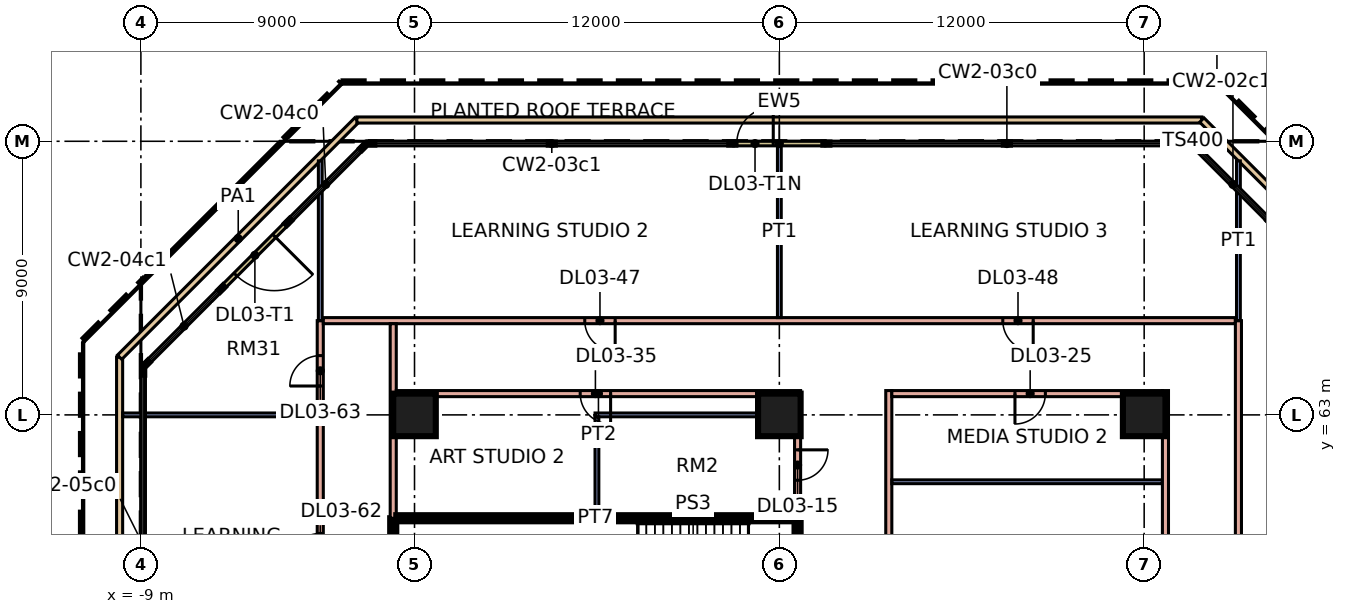
"""IFC4 building model, lengths in metres.
Left out: names, types, materials, properties, quantities, classifications, styles, units other than length and angle.
Written with IfcOpenShell. Run it as: python <this file> out.ifc"""

import sys

from ifc_helpers import new_model, si_unit, direction, frame, frame_2d, origin, origin_2d, place, context, subcontext, project, spatial, rectangle, extrude, element, fill, save


model = new_model("IFC4")
c1 = context("Model", 3, precision=1e-05, world=origin(), true_north=direction((0.0, 1.0)))
c2 = subcontext(c1, "Body", "Model", "MODEL_VIEW")
j1 = project(units=[si_unit("LENGTHUNIT", "METRE"), si_unit("PLANEANGLEUNIT", "RADIAN")], contexts=[c1])
p1 = place(None, origin())
s1 = spatial("IfcSite", under=j1, at=p1, CompositionType="ELEMENT")
p2 = place(p1, origin())
s2 = spatial("IfcBuilding", under=s1, at=p2, CompositionType="ELEMENT")
p3 = place(p2, frame((0.0, 0.0, 16.8)))
s3 = spatial("IfcBuildingStorey", under=s2, at=p3, CompositionType="ELEMENT", Elevation=16.8)
for number, where, z_axis, x_axis in (
    (1, (0.0, 63.0, 0.0), (0.0, 0.0, 1.0), (1.0, 0.0, 0.0)),
    (2, (12.0, 63.0, 0.0), (0.0, 0.0, 1.0), (1.0, 0.0, 0.0)),
    (3, (24.0, 63.0, 0.0), (0.0, 0.0, 1.0), (1.0, 0.0, 0.0)),
):
    element("IfcColumn", number, at=place(p3, frame(where, z_axis=z_axis, x_axis=x_axis)), inside=s3, PredefinedType="COLUMN", context=c2, shape_type="SweptSolid", body=[
        extrude(rectangle(XDim=1.4, YDim=1.4, at=origin_2d()), origin(), (0.0, 0.0, 1.0), 4.8),
    ])
p4 = place(p3, frame((13.5, 71.925, 0.0), z_axis=(0.0, 0.0, 1.0), x_axis=(-1.0, 0.0, 0.0)))
e4 = element("IfcWall", 4, at=p4, inside=s3, PredefinedType="SOLIDWALL", context=c2, shape_type="SweptSolid", body=[
    extrude(rectangle(XDim=3.0, YDim=0.15, at=frame_2d((1.5, 0.0))), origin(), (0.0, 0.0, 1.0), 4.4),
])
p5 = place(p4, frame((1.7, 0.0, 0.0)))
e5 = element("IfcOpeningElement", 5, at=p5, cuts=e4, PredefinedType="OPENING", context=c2, shape_type="SweptSolid", body=[
    extrude(rectangle(XDim=1.2, YDim=2.4, at=frame_2d((0.6, 1.2))), frame((0.0, 0.085, 0.0), z_axis=(0.0, -1.0, 0.0), x_axis=(1.0, 0.0, 0.0)), (0.0, 0.0, 1.0), 0.17),
])
p6 = place(p3, frame((-4.19, 69.311, 0.0), z_axis=(0.0, 0.0, 1.0), x_axis=(-0.707106781187, -0.707106781187, 0.0)))
e6 = element("IfcWall", 6, at=p6, inside=s3, PredefinedType="SOLIDWALL", context=c2, shape_type="SweptSolid", body=[
    extrude(rectangle(XDim=3.0, YDim=0.15, at=frame_2d((1.5, 0.0))), origin(), (0.0, 0.0, 1.0), 4.4),
])
p7 = place(p6, frame((0.6, 0.0, 0.0)))
e7 = element("IfcOpeningElement", 7, at=p7, cuts=e6, PredefinedType="OPENING", context=c2, shape_type="SweptSolid", body=[
    extrude(rectangle(XDim=1.8, YDim=2.4, at=frame_2d((0.9, 1.2))), frame((0.0, 0.085, 0.0), z_axis=(0.0, -1.0, 0.0), x_axis=(1.0, 0.0, 0.0)), (0.0, 0.0, 1.0), 0.17),
])
p8 = place(p3, frame((-9.7, 9.104, 0.0), z_axis=(0.0, 0.0, 1.0), x_axis=(0.0, 1.0, 0.0)))
e8 = element("IfcWall", 8, at=p8, inside=s3, PredefinedType="PARAPET", context=c2, shape_type="SweptSolid", body=[
    extrude(rectangle(XDim=55.793, YDim=0.2, at=frame_2d((27.896, 0.0))), origin(), (0.0, 0.0, 1.0), 0.5),
])
p9 = place(p3, frame((-9.7, 64.896, 0.0), z_axis=(0.0, 0.0, 1.0), x_axis=(0.707106781187, 0.707106781187, 0.0)))
e9 = element("IfcWall", 9, at=p9, inside=s3, PredefinedType="PARAPET", context=c2, shape_type="SweptSolid", body=[
    extrude(rectangle(XDim=11.036, YDim=0.2, at=frame_2d((5.518, 0.0))), origin(), (0.0, 0.0, 1.0), 0.5),
])
p10 = place(p3, frame((-1.896, 72.7, 0.0), z_axis=(0.0, 0.0, 1.0), x_axis=(1.0, 0.0, 0.0)))
e10 = element("IfcWall", 10, at=p10, inside=s3, PredefinedType="PARAPET", context=c2, shape_type="SweptSolid", body=[
    extrude(rectangle(XDim=27.793, YDim=0.2, at=frame_2d((13.896, 0.0))), origin(), (0.0, 0.0, 1.0), 0.5),
])
p11 = place(p3, frame((25.896, 72.7, 0.0), z_axis=(0.0, 0.0, 1.0), x_axis=(0.707106781187, -0.707106781187, 0.0)))
e11 = element("IfcWall", 11, at=p11, inside=s3, PredefinedType="PARAPET", context=c2, shape_type="SweptSolid", body=[
    extrude(rectangle(XDim=11.036, YDim=0.2, at=frame_2d((5.518, 0.0))), origin(), (0.0, 0.0, 1.0), 0.5),
])
p12 = place(p3, frame((-9.6, 63.0, 0.0), z_axis=(0.0, 0.0, 1.0), x_axis=(1.0, 0.0, 0.0)))
e12 = element("IfcWall", 12, at=p12, inside=s3, PredefinedType="PARTITIONING", context=c2, shape_type="SweptSolid", body=[
    extrude(rectangle(XDim=6.4, YDim=0.125, at=frame_2d((3.2, 0.0))), origin(), (0.0, 0.0, 1.0), 4.4),
])
p13 = place(p3, frame((-3.1, 2.645, 0.0), z_axis=(0.0, 0.0, 1.0), x_axis=(0.0, 1.0, 0.0)))
e13 = element("IfcWall", 13, at=p13, inside=s3, PredefinedType="PARTITIONING", context=c2, shape_type="SweptSolid", body=[
    extrude(rectangle(XDim=63.455, YDim=0.2, at=frame_2d((31.728, 0.0))), origin(), (0.0, 0.0, 1.0), 4.4),
])
p14 = place(p13, frame((4.705, 0.0, 0.0)))
e14 = element("IfcOpeningElement", 14, at=p14, cuts=e13, PredefinedType="OPENING", context=c2, shape_type="SweptSolid", body=[
    extrude(rectangle(XDim=1.0, YDim=2.1, at=frame_2d((0.5, 1.05))), frame((0.0, 0.11, 0.0), z_axis=(0.0, -1.0, 0.0), x_axis=(1.0, 0.0, 0.0)), (0.0, 0.0, 1.0), 0.22),
])
p15 = place(p13, frame((14.955, 0.0, 0.0)))
e15 = element("IfcOpeningElement", 15, at=p15, cuts=e13, PredefinedType="OPENING", context=c2, shape_type="SweptSolid", body=[
    extrude(rectangle(XDim=1.0, YDim=2.1, at=frame_2d((0.5, 1.05))), frame((0.0, 0.11, 0.0), z_axis=(0.0, -1.0, 0.0), x_axis=(1.0, 0.0, 0.0)), (0.0, 0.0, 1.0), 0.22),
])
p16 = place(p13, frame((26.955, 0.0, 0.0)))
e16 = element("IfcOpeningElement", 16, at=p16, cuts=e13, PredefinedType="OPENING", context=c2, shape_type="SweptSolid", body=[
    extrude(rectangle(XDim=1.0, YDim=2.1, at=frame_2d((0.5, 1.05))), frame((0.0, 0.11, 0.0), z_axis=(0.0, -1.0, 0.0), x_axis=(1.0, 0.0, 0.0)), (0.0, 0.0, 1.0), 0.22),
])
p17 = place(p13, frame((37.455, 0.0, 0.0)))
e17 = element("IfcOpeningElement", 17, at=p17, cuts=e13, PredefinedType="OPENING", context=c2, shape_type="SweptSolid", body=[
    extrude(rectangle(XDim=1.0, YDim=2.1, at=frame_2d((0.5, 1.05))), frame((0.0, 0.11, 0.0), z_axis=(0.0, -1.0, 0.0), x_axis=(1.0, 0.0, 0.0)), (0.0, 0.0, 1.0), 0.22),
])
p18 = place(p13, frame((46.455, 0.0, 0.0)))
e18 = element("IfcOpeningElement", 18, at=p18, cuts=e13, PredefinedType="OPENING", context=c2, shape_type="SweptSolid", body=[
    extrude(rectangle(XDim=1.0, YDim=2.1, at=frame_2d((0.5, 1.05))), frame((0.0, 0.11, 0.0), z_axis=(0.0, -1.0, 0.0), x_axis=(1.0, 0.0, 0.0)), (0.0, 0.0, 1.0), 0.22),
])
p19 = place(p13, frame((55.455, 0.0, 0.0)))
e19 = element("IfcOpeningElement", 19, at=p19, cuts=e13, PredefinedType="OPENING", context=c2, shape_type="SweptSolid", body=[
    extrude(rectangle(XDim=1.0, YDim=2.1, at=frame_2d((0.5, 1.05))), frame((0.0, 0.11, 0.0), z_axis=(0.0, -1.0, 0.0), x_axis=(1.0, 0.0, 0.0)), (0.0, 0.0, 1.0), 0.22),
])
p20 = place(p13, frame((61.305, 0.0, 0.0)))
e20 = element("IfcOpeningElement", 20, at=p20, cuts=e13, PredefinedType="OPENING", context=c2, shape_type="SweptSolid", body=[
    extrude(rectangle(XDim=1.0, YDim=2.1, at=frame_2d((0.5, 1.05))), frame((0.0, 0.11, 0.0), z_axis=(0.0, -1.0, 0.0), x_axis=(1.0, 0.0, 0.0)), (0.0, 0.0, 1.0), 0.22),
])
p21 = place(p3, frame((-3.1, 66.1, 0.0), z_axis=(0.0, 0.0, 1.0), x_axis=(0.0, 1.0, 0.0)))
e21 = element("IfcWall", 21, at=p21, inside=s3, PredefinedType="PARTITIONING", context=c2, shape_type="SweptSolid", body=[
    extrude(rectangle(XDim=5.255, YDim=0.125, at=frame_2d((2.627, 0.0))), origin(), (0.0, 0.0, 1.0), 4.4),
])
p22 = place(p3, frame((-3.0, 66.1, 0.0), z_axis=(0.0, 0.0, 1.0), x_axis=(1.0, 0.0, 0.0)))
e22 = element("IfcWall", 22, at=p22, inside=s3, PredefinedType="PARTITIONING", context=c2, shape_type="SweptSolid", body=[
    extrude(rectangle(XDim=30.0, YDim=0.2, at=frame_2d((15.0, 0.0))), origin(), (0.0, 0.0, 1.0), 4.4),
])
p23 = place(p22, frame((8.6, 0.0, 0.0)))
e23 = element("IfcOpeningElement", 23, at=p23, cuts=e22, PredefinedType="OPENING", context=c2, shape_type="SweptSolid", body=[
    extrude(rectangle(XDim=1.0, YDim=2.1, at=frame_2d((0.5, 1.05))), frame((0.0, 0.11, 0.0), z_axis=(0.0, -1.0, 0.0), x_axis=(1.0, 0.0, 0.0)), (0.0, 0.0, 1.0), 0.22),
])
p24 = place(p22, frame((22.35, 0.0, 0.0)))
e24 = element("IfcOpeningElement", 24, at=p24, cuts=e22, PredefinedType="OPENING", context=c2, shape_type="SweptSolid", body=[
    extrude(rectangle(XDim=1.0, YDim=2.1, at=frame_2d((0.5, 1.05))), frame((0.0, 0.11, 0.0), z_axis=(0.0, -1.0, 0.0), x_axis=(1.0, 0.0, 0.0)), (0.0, 0.0, 1.0), 0.22),
])
p25 = place(p3, frame((-0.7, 54.0, 0.0), z_axis=(0.0, 0.0, 1.0), x_axis=(0.0, 1.0, 0.0)))
e25 = element("IfcWall", 25, at=p25, inside=s3, PredefinedType="SOLIDWALL", context=c2, shape_type="SweptSolid", body=[
    extrude(rectangle(XDim=5.6, YDim=0.2, at=frame_2d((2.8, 0.0))), origin(), (0.0, 0.0, 1.0), 4.4),
])
p26 = place(p3, frame((-0.7, 59.6, 0.0), z_axis=(0.0, 0.0, 1.0), x_axis=(0.0, 1.0, 0.0)))
e26 = element("IfcWall", 26, at=p26, inside=s3, PredefinedType="PARTITIONING", context=c2, shape_type="SweptSolid", body=[
    extrude(rectangle(XDim=6.4, YDim=0.2, at=frame_2d((3.2, 0.0))), origin(), (0.0, 0.0, 1.0), 4.4),
])
p27 = place(p3, frame((-0.6, 59.6, 0.0), z_axis=(0.0, 0.0, 1.0), x_axis=(1.0, 0.0, 0.0)))
e27 = element("IfcWall", 27, at=p27, inside=s3, PredefinedType="SOLIDWALL", context=c2, shape_type="SweptSolid", body=[
    extrude(rectangle(XDim=13.1, YDim=0.2, at=frame_2d((6.55, 0.0))), origin(), (0.0, 0.0, 1.0), 4.4),
])
p28 = place(p3, frame((-0.6, 63.7, 0.0), z_axis=(0.0, 0.0, 1.0), x_axis=(1.0, 0.0, 0.0)))
e28 = element("IfcWall", 28, at=p28, inside=s3, PredefinedType="PARTITIONING", context=c2, shape_type="SweptSolid", body=[
    extrude(rectangle(XDim=13.3, YDim=0.2, at=frame_2d((6.65, 0.0))), origin(), (0.0, 0.0, 1.0), 4.4),
])
p29 = place(p28, frame((6.05, 0.0, 0.0)))
e29 = element("IfcOpeningElement", 29, at=p29, cuts=e28, PredefinedType="OPENING", context=c2, shape_type="SweptSolid", body=[
    extrude(rectangle(XDim=1.0, YDim=2.1, at=frame_2d((0.5, 1.05))), frame((0.0, 0.11, 0.0), z_axis=(0.0, -1.0, 0.0), x_axis=(1.0, 0.0, 0.0)), (0.0, 0.0, 1.0), 0.22),
])
p30 = place(p3, frame((5.938, 63.0, 0.0), z_axis=(0.0, 0.0, 1.0), x_axis=(1.0, 0.0, 0.0)))
e30 = element("IfcWall", 30, at=p30, inside=s3, PredefinedType="PARTITIONING", context=c2, shape_type="SweptSolid", body=[
    extrude(rectangle(XDim=6.562, YDim=0.125, at=frame_2d((3.281, 0.0))), origin(), (0.0, 0.0, 1.0), 4.4),
])
p31 = place(p3, frame((6.0, 59.7, 0.0), z_axis=(0.0, 0.0, 1.0), x_axis=(0.0, 1.0, 0.0)))
e31 = element("IfcWall", 31, at=p31, inside=s3, PredefinedType="PARTITIONING", context=c2, shape_type="SweptSolid", body=[
    extrude(rectangle(XDim=3.238, YDim=0.125, at=frame_2d((1.619, 0.0))), origin(), (0.0, 0.0, 1.0), 4.4),
])
p32 = place(p3, frame((12.0, 66.2, 0.0), z_axis=(0.0, 0.0, 1.0), x_axis=(0.0, 1.0, 0.0)))
e32 = element("IfcWall", 32, at=p32, inside=s3, PredefinedType="PARTITIONING", context=c2, shape_type="SweptSolid", body=[
    extrude(rectangle(XDim=5.651, YDim=0.125, at=frame_2d((2.826, 0.0))), origin(), (0.0, 0.0, 1.0), 4.4),
])
p33 = place(p3, frame((12.6, 54.0, 0.0), z_axis=(0.0, 0.0, 1.0), x_axis=(0.0, 1.0, 0.0)))
e33 = element("IfcWall", 33, at=p33, inside=s3, PredefinedType="SOLIDWALL", context=c2, shape_type="SweptSolid", body=[
    extrude(rectangle(XDim=5.6, YDim=0.2, at=frame_2d((2.8, 0.0))), origin(), (0.0, 0.0, 1.0), 4.4),
])
p34 = place(p33, frame((3.25, 0.0, 0.0)))
e34 = element("IfcOpeningElement", 34, at=p34, cuts=e33, PredefinedType="OPENING", context=c2, shape_type="SweptSolid", body=[
    extrude(rectangle(XDim=1.2, YDim=2.1, at=frame_2d((0.6, 1.05))), frame((0.0, 0.11, 0.0), z_axis=(0.0, -1.0, 0.0), x_axis=(1.0, 0.0, 0.0)), (0.0, 0.0, 1.0), 0.22),
])
p35 = place(p3, frame((12.6, 59.6, 0.0), z_axis=(0.0, 0.0, 1.0), x_axis=(0.0, 1.0, 0.0)))
e35 = element("IfcWall", 35, at=p35, inside=s3, PredefinedType="PARTITIONING", context=c2, shape_type="SweptSolid", body=[
    extrude(rectangle(XDim=4.0, YDim=0.2, at=frame_2d((2.0, 0.0))), origin(), (0.0, 0.0, 1.0), 4.4),
])
p36 = place(p35, frame((1.25, 0.0, 0.0)))
e36 = element("IfcOpeningElement", 36, at=p36, cuts=e35, PredefinedType="OPENING", context=c2, shape_type="SweptSolid", body=[
    extrude(rectangle(XDim=1.0, YDim=2.1, at=frame_2d((0.5, 1.05))), frame((0.0, 0.11, 0.0), z_axis=(0.0, -1.0, 0.0), x_axis=(1.0, 0.0, 0.0)), (0.0, 0.0, 1.0), 0.22),
])
p37 = place(p3, frame((15.6, 51.225, 0.0), z_axis=(0.0, 0.0, 1.0), x_axis=(0.0, 1.0, 0.0)))
e37 = element("IfcWall", 37, at=p37, inside=s3, PredefinedType="PARTITIONING", context=c2, shape_type="SweptSolid", body=[
    extrude(rectangle(XDim=12.575, YDim=0.2, at=frame_2d((6.288, 0.0))), origin(), (0.0, 0.0, 1.0), 4.4),
])
p38 = place(p37, frame((6.025, 0.0, 0.0)))
e38 = element("IfcOpeningElement", 38, at=p38, cuts=e37, PredefinedType="OPENING", context=c2, shape_type="SweptSolid", body=[
    extrude(rectangle(XDim=1.0, YDim=2.1, at=frame_2d((0.5, 1.05))), frame((0.0, 0.11, 0.0), z_axis=(0.0, -1.0, 0.0), x_axis=(1.0, 0.0, 0.0)), (0.0, 0.0, 1.0), 0.22),
])
p39 = place(p3, frame((15.7, 60.8, 0.0), z_axis=(0.0, 0.0, 1.0), x_axis=(1.0, 0.0, 0.0)))
e39 = element("IfcWall", 39, at=p39, inside=s3, PredefinedType="PARTITIONING", context=c2, shape_type="SweptSolid", body=[
    extrude(rectangle(XDim=8.9, YDim=0.125, at=frame_2d((4.45, 0.0))), origin(), (0.0, 0.0, 1.0), 4.4),
])
p40 = place(p3, frame((15.7, 63.7, 0.0), z_axis=(0.0, 0.0, 1.0), x_axis=(1.0, 0.0, 0.0)))
e40 = element("IfcWall", 40, at=p40, inside=s3, PredefinedType="PARTITIONING", context=c2, shape_type="SweptSolid", body=[
    extrude(rectangle(XDim=8.9, YDim=0.2, at=frame_2d((4.45, 0.0))), origin(), (0.0, 0.0, 1.0), 4.4),
])
p41 = place(p40, frame((4.05, 0.0, 0.0)))
e41 = element("IfcOpeningElement", 41, at=p41, cuts=e40, PredefinedType="OPENING", context=c2, shape_type="SweptSolid", body=[
    extrude(rectangle(XDim=1.0, YDim=2.1, at=frame_2d((0.5, 1.05))), frame((0.0, 0.11, 0.0), z_axis=(0.0, -1.0, 0.0), x_axis=(1.0, 0.0, 0.0)), (0.0, 0.0, 1.0), 0.22),
])
p42 = place(p3, frame((24.7, 44.3, 0.0), z_axis=(0.0, 0.0, 1.0), x_axis=(0.0, 1.0, 0.0)))
e42 = element("IfcWall", 42, at=p42, inside=s3, PredefinedType="PARTITIONING", context=c2, shape_type="SweptSolid", body=[
    extrude(rectangle(XDim=19.5, YDim=0.2, at=frame_2d((9.75, 0.0))), origin(), (0.0, 0.0, 1.0), 4.4),
])
p43 = place(p42, frame((1.45, 0.0, 0.0)))
e43 = element("IfcOpeningElement", 43, at=p43, cuts=e42, PredefinedType="OPENING", context=c2, shape_type="SweptSolid", body=[
    extrude(rectangle(XDim=1.0, YDim=2.1, at=frame_2d((0.5, 1.05))), frame((0.0, 0.11, 0.0), z_axis=(0.0, -1.0, 0.0), x_axis=(1.0, 0.0, 0.0)), (0.0, 0.0, 1.0), 0.22),
])
p44 = place(p42, frame((6.65, 0.0, 0.0)))
e44 = element("IfcOpeningElement", 44, at=p44, cuts=e42, PredefinedType="OPENING", context=c2, shape_type="SweptSolid", body=[
    extrude(rectangle(XDim=1.0, YDim=2.1, at=frame_2d((0.5, 1.05))), frame((0.0, 0.11, 0.0), z_axis=(0.0, -1.0, 0.0), x_axis=(1.0, 0.0, 0.0)), (0.0, 0.0, 1.0), 0.22),
])
p45 = place(p3, frame((27.1, 38.5, 0.0), z_axis=(0.0, 0.0, 1.0), x_axis=(0.0, 1.0, 0.0)))
e45 = element("IfcWall", 45, at=p45, inside=s3, PredefinedType="PARTITIONING", context=c2, shape_type="SweptSolid", body=[
    extrude(rectangle(XDim=27.6, YDim=0.2, at=frame_2d((13.8, 0.0))), origin(), (0.0, 0.0, 1.0), 4.4),
])
p46 = place(p45, frame((13.05, 0.0, 0.0)))
e46 = element("IfcOpeningElement", 46, at=p46, cuts=e45, PredefinedType="OPENING", context=c2, shape_type="SweptSolid", body=[
    extrude(rectangle(XDim=1.8, YDim=2.1, at=frame_2d((0.9, 1.05))), frame((0.0, 0.11, 0.0), z_axis=(0.0, -1.0, 0.0), x_axis=(1.0, 0.0, 0.0)), (0.0, 0.0, 1.0), 0.22),
])
p47 = place(p45, frame((3.05, 0.0, 0.0)))
e47 = element("IfcOpeningElement", 47, at=p47, cuts=e45, PredefinedType="OPENING", context=c2, shape_type="SweptSolid", body=[
    extrude(rectangle(XDim=1.8, YDim=2.1, at=frame_2d((0.9, 1.05))), frame((0.0, 0.11, 0.0), z_axis=(0.0, -1.0, 0.0), x_axis=(1.0, 0.0, 0.0)), (0.0, 0.0, 1.0), 0.22),
])
p48 = place(p3, frame((27.1, 66.1, 0.0), z_axis=(0.0, 0.0, 1.0), x_axis=(0.0, 1.0, 0.0)))
e48 = element("IfcWall", 48, at=p48, inside=s3, PredefinedType="PARTITIONING", context=c2, shape_type="SweptSolid", body=[
    extrude(rectangle(XDim=5.255, YDim=0.125, at=frame_2d((2.627, 0.0))), origin(), (0.0, 0.0, 1.0), 4.4),
])
p49 = place(p5, frame((1.2, 0.0, 0.0), z_axis=(0.0, 0.0, 1.0), x_axis=(-1.0, 0.0, 0.0)))
e49 = element("IfcDoor", 49, at=p49, inside=s3, OperationType="DOUBLE_DOOR_SINGLE_SWING", PredefinedType="DOOR", context=c2, shape_type="SweptSolid", body=[
    extrude(rectangle(XDim=1.2, YDim=2.4, at=frame_2d((0.6, 1.2))), frame((0.0, 0.025, 0.0), z_axis=(0.0, -1.0, 0.0), x_axis=(1.0, 0.0, 0.0)), (0.0, 0.0, 1.0), 0.05),
])
fill(e5, e49)
p50 = place(p7, origin())
e50 = element("IfcDoor", 50, at=p50, inside=s3, OperationType="DOUBLE_DOOR_SINGLE_SWING", PredefinedType="DOOR", context=c2, shape_type="SweptSolid", body=[
    extrude(rectangle(XDim=1.8, YDim=2.4, at=frame_2d((0.9, 1.2))), frame((0.0, 0.025, 0.0), z_axis=(0.0, -1.0, 0.0), x_axis=(1.0, 0.0, 0.0)), (0.0, 0.0, 1.0), 0.05),
])
fill(e7, e50)
p51 = place(p36, origin())
e51 = element("IfcDoor", 51, at=p51, inside=s3, OperationType="SINGLE_SWING_RIGHT", PredefinedType="DOOR", context=c2, shape_type="SweptSolid", body=[
    extrude(rectangle(XDim=1.0, YDim=2.1, at=frame_2d((0.5, 1.05))), frame((0.0, 0.025, 0.0), z_axis=(0.0, -1.0, 0.0), x_axis=(1.0, 0.0, 0.0)), (0.0, 0.0, 1.0), 0.05),
])
fill(e36, e51)
p52 = place(p41, frame((1.0, 0.0, 0.0), z_axis=(0.0, 0.0, 1.0), x_axis=(-1.0, 0.0, 0.0)))
e52 = element("IfcDoor", 52, at=p52, inside=s3, OperationType="SINGLE_SWING_LEFT", PredefinedType="DOOR", context=c2, shape_type="SweptSolid", body=[
    extrude(rectangle(XDim=1.0, YDim=2.1, at=frame_2d((0.5, 1.05))), frame((0.0, 0.025, 0.0), z_axis=(0.0, -1.0, 0.0), x_axis=(1.0, 0.0, 0.0)), (0.0, 0.0, 1.0), 0.05),
])
fill(e41, e52)
p53 = place(p29, origin())
e53 = element("IfcDoor", 53, at=p53, inside=s3, OperationType="SINGLE_SWING_RIGHT", PredefinedType="DOOR", context=c2, shape_type="SweptSolid", body=[
    extrude(rectangle(XDim=1.0, YDim=2.1, at=frame_2d((0.5, 1.05))), frame((0.0, 0.025, 0.0), z_axis=(0.0, -1.0, 0.0), x_axis=(1.0, 0.0, 0.0)), (0.0, 0.0, 1.0), 0.05),
])
fill(e29, e53)
p54 = place(p23, origin())
e54 = element("IfcDoor", 54, at=p54, inside=s3, OperationType="SINGLE_SWING_RIGHT", PredefinedType="DOOR", context=c2, shape_type="SweptSolid", body=[
    extrude(rectangle(XDim=1.0, YDim=2.1, at=frame_2d((0.5, 1.05))), frame((0.0, 0.025, 0.0), z_axis=(0.0, -1.0, 0.0), x_axis=(1.0, 0.0, 0.0)), (0.0, 0.0, 1.0), 0.05),
])
fill(e23, e54)
p55 = place(p24, origin())
e55 = element("IfcDoor", 55, at=p55, inside=s3, OperationType="SINGLE_SWING_RIGHT", PredefinedType="DOOR", context=c2, shape_type="SweptSolid", body=[
    extrude(rectangle(XDim=1.0, YDim=2.1, at=frame_2d((0.5, 1.05))), frame((0.0, 0.025, 0.0), z_axis=(0.0, -1.0, 0.0), x_axis=(1.0, 0.0, 0.0)), (0.0, 0.0, 1.0), 0.05),
])
fill(e24, e55)
p56 = place(p19, origin())
e56 = element("IfcDoor", 56, at=p56, inside=s3, OperationType="SINGLE_SWING_LEFT", PredefinedType="DOOR", context=c2, shape_type="SweptSolid", body=[
    extrude(rectangle(XDim=1.0, YDim=2.1, at=frame_2d((0.5, 1.05))), frame((0.0, 0.025, 0.0), z_axis=(0.0, -1.0, 0.0), x_axis=(1.0, 0.0, 0.0)), (0.0, 0.0, 1.0), 0.05),
])
fill(e19, e56)
p57 = place(p20, origin())
e57 = element("IfcDoor", 57, at=p57, inside=s3, OperationType="SINGLE_SWING_LEFT", PredefinedType="DOOR", context=c2, shape_type="SweptSolid", body=[
    extrude(rectangle(XDim=1.0, YDim=2.1, at=frame_2d((0.5, 1.05))), frame((0.0, 0.025, 0.0), z_axis=(0.0, -1.0, 0.0), x_axis=(1.0, 0.0, 0.0)), (0.0, 0.0, 1.0), 0.05),
])
fill(e20, e57)
save(model, sys.argv[1])
